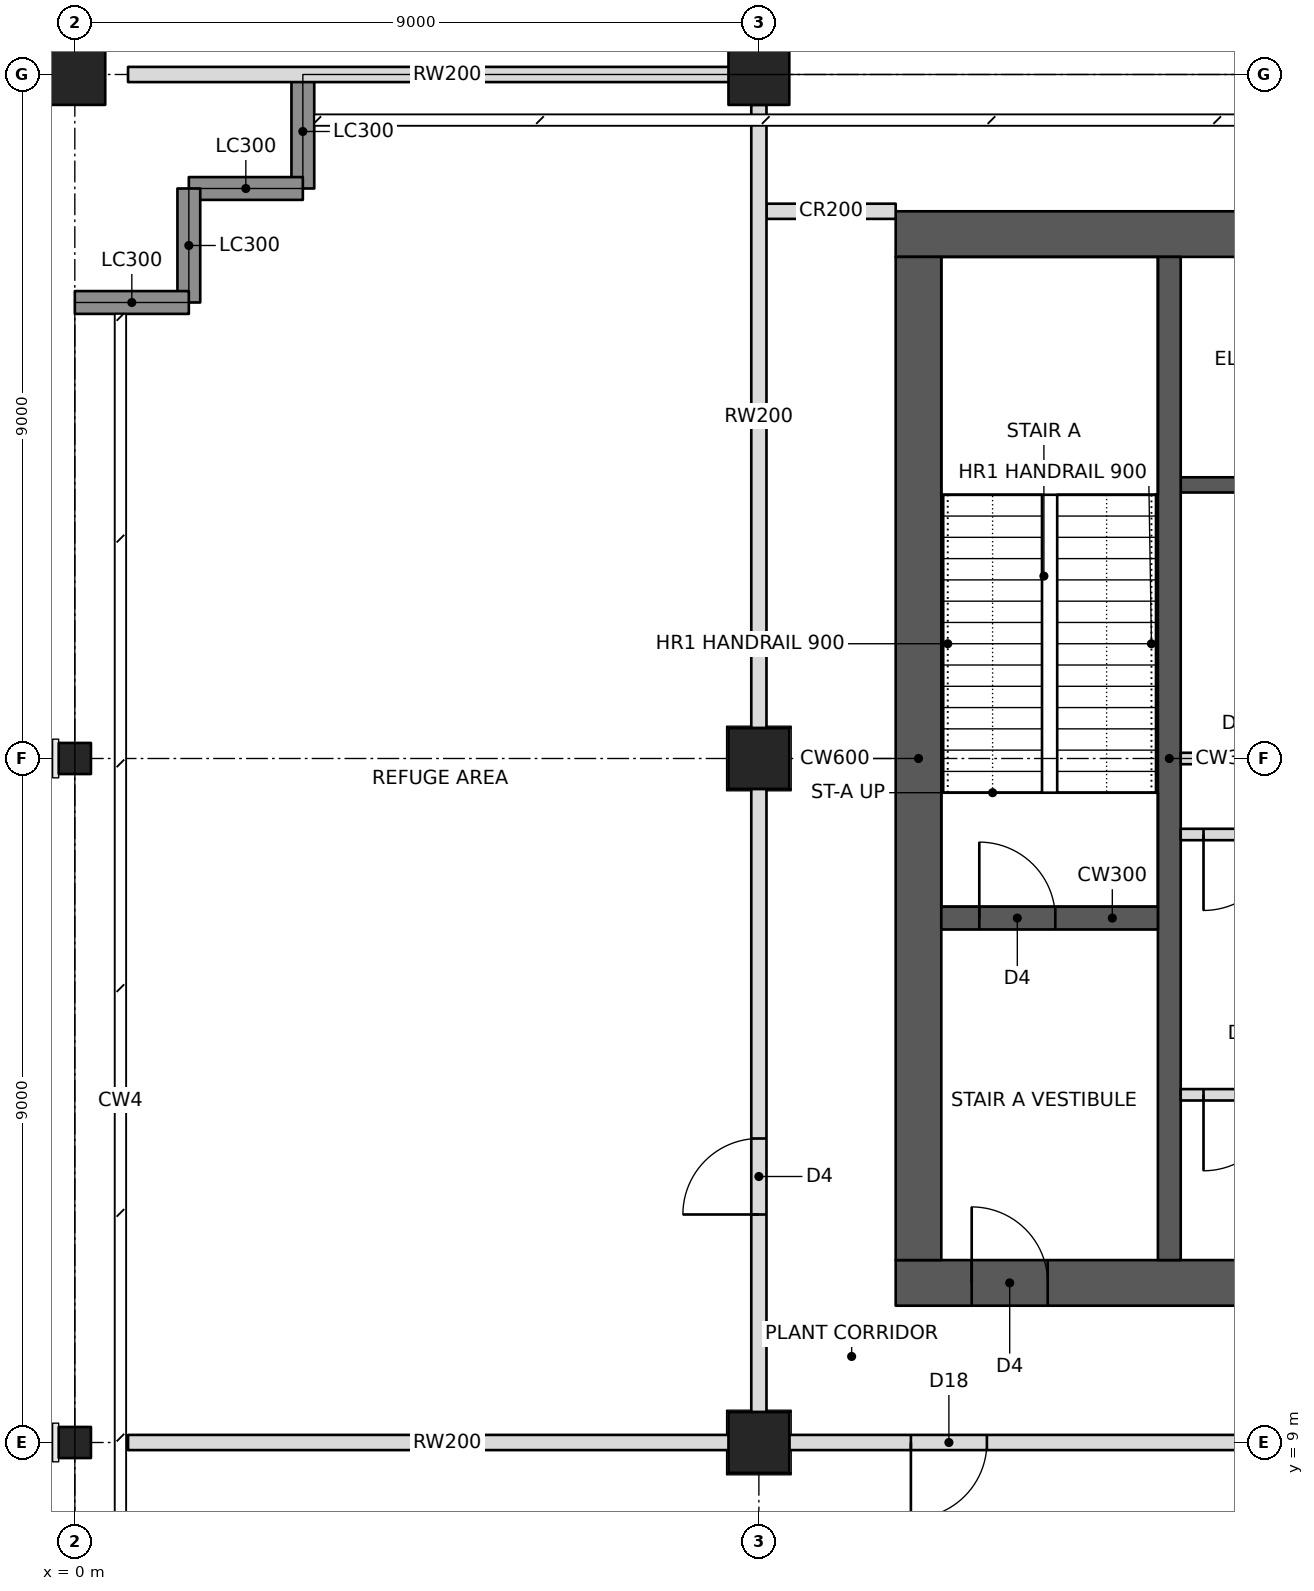
"""IFC4 building model, lengths in metres.
Left out: names, types, materials, properties, quantities, classifications, styles, units other than length and angle.
Written with IfcOpenShell. Run it as: python <this file> out.ifc"""

import sys

from ifc_helpers import new_model, si_unit, direction, frame, frame_2d, origin, origin_2d, place, context, subcontext, project, spatial, rectangle, hollow_rectangle, i_section, extrude, element, fill, save


model = new_model("IFC4")
c1 = context("Model", 3, precision=1e-05, world=origin(), true_north=direction((0.0, 1.0)))
c2 = subcontext(c1, "Body", "Model", "MODEL_VIEW")
j1 = project(units=[si_unit("LENGTHUNIT", "METRE"), si_unit("PLANEANGLEUNIT", "RADIAN")], contexts=[c1])
p1 = place(None, origin())
s1 = spatial("IfcSite", under=j1, at=p1, CompositionType="ELEMENT")
p2 = place(p1, origin())
s2 = spatial("IfcBuilding", under=s1, at=p2, CompositionType="ELEMENT")
p3 = place(p2, frame((0.0, 0.0, 274.8)))
s3 = spatial("IfcBuildingStorey", under=s2, at=p3, CompositionType="ELEMENT", Elevation=274.8)
for number, where, z_axis, x_axis in (
    (1, (0.0, 9.0, 0.0), (0.0, 0.0, 1.0), (0.0, 1.0, 0.0)),
    (2, (0.0, 18.0, 0.0), (0.0, 0.0, 1.0), (0.0, 1.0, 0.0)),
):
    element("IfcColumn", number, at=place(p3, frame(where, z_axis=z_axis, x_axis=x_axis)), inside=s3, PredefinedType="COLUMN", context=c2, shape_type="SweptSolid", body=[
        extrude(i_section(OverallWidth=0.409, OverallDepth=0.424, WebThickness=0.033, FlangeThickness=0.052, at=origin_2d()), origin(), (0.0, 0.0, 1.0), 5.0),
    ])
for number, where, z_axis, x_axis in (
    (3, (0.0, 27.0, 0.0), (0.0, 0.0, 1.0), (0.0, 1.0, 0.0)),
    (4, (9.0, 9.0, 0.0), (0.0, 0.0, 1.0), (1.0, 0.0, 0.0)),
    (5, (9.0, 18.0, 0.0), (0.0, 0.0, 1.0), (1.0, 0.0, 0.0)),
    (6, (9.0, 27.0, 0.0), (0.0, 0.0, 1.0), (1.0, 0.0, 0.0)),
):
    element("IfcColumn", number, at=place(p3, frame(where, z_axis=z_axis, x_axis=x_axis)), inside=s3, PredefinedType="COLUMN", context=c2, shape_type="SweptSolid", body=[
        extrude(hollow_rectangle(XDim=0.8, YDim=0.8, WallThickness=0.025, at=origin_2d()), origin(), (0.0, 0.0, 1.0), 5.0),
    ])
p4 = place(p3, frame((10.8, 11.1, 0.0), z_axis=(0.0, 0.0, 1.0), x_axis=(1.0, 0.0, 0.0)))
e7 = element("IfcWall", 7, at=p4, inside=s3, PredefinedType="SHEAR", context=c2, shape_type="SweptSolid", body=[
    extrude(rectangle(XDim=23.4, YDim=0.6, at=frame_2d((11.7, 0.0))), origin(), (0.0, 0.0, 1.0), 4.7),
])
p5 = place(p4, frame((1.0, 0.0, 0.0)))
e8 = element("IfcOpeningElement", 8, at=p5, cuts=e7, PredefinedType="OPENING", context=c2, shape_type="SweptSolid", body=[
    extrude(rectangle(XDim=1.0, YDim=2.1, at=frame_2d((0.5, 1.05))), frame((0.0, 0.31, 0.0), z_axis=(0.0, -1.0, 0.0), x_axis=(1.0, 0.0, 0.0)), (0.0, 0.0, 1.0), 0.62),
])
p6 = place(p4, frame((17.2, 0.0, 0.0)))
e9 = element("IfcOpeningElement", 9, at=p6, cuts=e7, PredefinedType="OPENING", context=c2, shape_type="SweptSolid", body=[
    extrude(rectangle(XDim=1.8, YDim=2.1, at=frame_2d((0.9, 1.05))), frame((0.0, 0.31, 0.0), z_axis=(0.0, -1.0, 0.0), x_axis=(1.0, 0.0, 0.0)), (0.0, 0.0, 1.0), 0.62),
])
p7 = place(p3, frame((10.8, 24.9, 0.0), z_axis=(0.0, 0.0, 1.0), x_axis=(1.0, 0.0, 0.0)))
e10 = element("IfcWall", 10, at=p7, inside=s3, PredefinedType="SHEAR", context=c2, shape_type="SweptSolid", body=[
    extrude(rectangle(XDim=23.4, YDim=0.6, at=frame_2d((11.7, 0.0))), origin(), (0.0, 0.0, 1.0), 4.7),
])
p8 = place(p7, frame((17.2, 0.0, 0.0)))
e11 = element("IfcOpeningElement", 11, at=p8, cuts=e10, PredefinedType="OPENING", context=c2, shape_type="SweptSolid", body=[
    extrude(rectangle(XDim=1.8, YDim=2.1, at=frame_2d((0.9, 1.05))), frame((0.0, 0.31, 0.0), z_axis=(0.0, -1.0, 0.0), x_axis=(1.0, 0.0, 0.0)), (0.0, 0.0, 1.0), 0.62),
])
p9 = place(p7, frame((21.1, 0.0, 0.0)))
e12 = element("IfcOpeningElement", 12, at=p9, cuts=e10, PredefinedType="OPENING", context=c2, shape_type="SweptSolid", body=[
    extrude(rectangle(XDim=1.0, YDim=2.1, at=frame_2d((0.5, 1.05))), frame((0.0, 0.31, 0.0), z_axis=(0.0, -1.0, 0.0), x_axis=(1.0, 0.0, 0.0)), (0.0, 0.0, 1.0), 0.62),
])
p10 = place(p7, frame((4.9, 0.0, 0.0)))
e13 = element("IfcOpeningElement", 13, at=p10, cuts=e10, PredefinedType="OPENING", context=c2, shape_type="SweptSolid", body=[
    extrude(rectangle(XDim=1.0, YDim=2.1, at=frame_2d((0.5, 1.05))), frame((0.0, 0.31, 0.0), z_axis=(0.0, -1.0, 0.0), x_axis=(1.0, 0.0, 0.0)), (0.0, 0.0, 1.0), 0.62),
])
p11 = place(p3, frame((11.1, 11.4, 0.0), z_axis=(0.0, 0.0, 1.0), x_axis=(0.0, 1.0, 0.0)))
e14 = element("IfcWall", 14, at=p11, inside=s3, PredefinedType="SHEAR", context=c2, shape_type="SweptSolid", body=[
    extrude(rectangle(XDim=13.2, YDim=0.6, at=frame_2d((6.6, 0.0))), origin(), (0.0, 0.0, 1.0), 4.7),
])
p12 = place(p3, frame((14.4, 11.4, 0.0), z_axis=(0.0, 0.0, 1.0), x_axis=(0.0, 1.0, 0.0)))
e15 = element("IfcWall", 15, at=p12, inside=s3, PredefinedType="SHEAR", context=c2, shape_type="SweptSolid", body=[
    extrude(rectangle(XDim=13.2, YDim=0.3, at=frame_2d((6.6, 0.0))), origin(), (0.0, 0.0, 1.0), 4.7),
])
p13 = place(p3, frame((11.4, 15.9, 0.0), z_axis=(0.0, 0.0, 1.0), x_axis=(1.0, 0.0, 0.0)))
e16 = element("IfcWall", 16, at=p13, inside=s3, PredefinedType="SHEAR", context=c2, shape_type="SweptSolid", body=[
    extrude(rectangle(XDim=2.85, YDim=0.3, at=frame_2d((1.425, 0.0))), origin(), (0.0, 0.0, 1.0), 4.7),
])
p14 = place(p13, frame((0.5, 0.0, 0.0)))
e17 = element("IfcOpeningElement", 17, at=p14, cuts=e16, PredefinedType="OPENING", context=c2, shape_type="SweptSolid", body=[
    extrude(rectangle(XDim=1.0, YDim=2.1, at=frame_2d((0.5, 1.05))), frame((0.0, 0.16, 0.0), z_axis=(0.0, -1.0, 0.0), x_axis=(1.0, 0.0, 0.0)), (0.0, 0.0, 1.0), 0.32),
])
p15 = place(p3, frame((14.55, 18.0, 0.0), z_axis=(0.0, 0.0, 1.0), x_axis=(1.0, 0.0, 0.0)))
e18 = element("IfcWall", 18, at=p15, inside=s3, PredefinedType="PARTITIONING", context=c2, shape_type="SweptSolid", body=[
    extrude(rectangle(XDim=3.3, YDim=0.15, at=frame_2d((1.65, 0.0))), origin(), (0.0, 0.0, 1.0), 4.7),
])
p16 = place(p3, frame((14.55, 21.6, 0.0), z_axis=(0.0, 0.0, 1.0), x_axis=(1.0, 0.0, 0.0)))
e19 = element("IfcWall", 19, at=p16, inside=s3, PredefinedType="SHEAR", context=c2, shape_type="SweptSolid", body=[
    extrude(rectangle(XDim=3.3, YDim=0.2, at=frame_2d((1.65, 0.0))), origin(), (0.0, 0.0, 1.0), 4.7),
])
p17 = place(p3, frame((3.0, 27.0, 0.0), z_axis=(0.0, 0.0, 1.0), x_axis=(0.0, -1.0, 0.0)))
e20 = element("IfcWall", 20, at=p17, inside=s3, PredefinedType="SOLIDWALL", context=c2, shape_type="SweptSolid", body=[
    extrude(rectangle(XDim=1.5, YDim=0.3, at=frame_2d((0.75, 0.0))), origin(), (0.0, 0.0, 1.0), 3.92),
])
p18 = place(p3, frame((3.0, 25.5, 0.0), z_axis=(0.0, 0.0, 1.0), x_axis=(-1.0, 0.0, 0.0)))
e21 = element("IfcWall", 21, at=p18, inside=s3, PredefinedType="SOLIDWALL", context=c2, shape_type="SweptSolid", body=[
    extrude(rectangle(XDim=1.5, YDim=0.3, at=frame_2d((0.75, 0.0))), origin(), (0.0, 0.0, 1.0), 4.092),
])
p19 = place(p3, frame((1.5, 25.5, 0.0), z_axis=(0.0, 0.0, 1.0), x_axis=(0.0, -1.0, 0.0)))
e22 = element("IfcWall", 22, at=p19, inside=s3, PredefinedType="SOLIDWALL", context=c2, shape_type="SweptSolid", body=[
    extrude(rectangle(XDim=1.5, YDim=0.3, at=frame_2d((0.75, 0.0))), origin(), (0.0, 0.0, 1.0), 4.7),
])
p20 = place(p3, frame((1.5, 24.0, 0.0), z_axis=(0.0, 0.0, 1.0), x_axis=(-1.0, 0.0, 0.0)))
e23 = element("IfcWall", 23, at=p20, inside=s3, PredefinedType="SOLIDWALL", context=c2, shape_type="SweptSolid", body=[
    extrude(rectangle(XDim=1.5, YDim=0.3, at=frame_2d((0.75, 0.0))), origin(), (0.0, 0.0, 1.0), 3.92),
])
p21 = place(p3, frame((9.0, 9.4, 0.0), z_axis=(0.0, 0.0, 1.0), x_axis=(0.0, 1.0, 0.0)))
e24 = element("IfcWall", 24, at=p21, inside=s3, PredefinedType="PARTITIONING", context=c2, shape_type="SweptSolid", body=[
    extrude(rectangle(XDim=8.2, YDim=0.2, at=frame_2d((4.1, 0.0))), origin(), (0.0, 0.0, 1.0), 3.938),
])
p22 = place(p21, frame((2.6, 0.0, 0.0)))
e25 = element("IfcOpeningElement", 25, at=p22, cuts=e24, PredefinedType="OPENING", context=c2, shape_type="SweptSolid", body=[
    extrude(rectangle(XDim=1.0, YDim=2.1, at=frame_2d((0.5, 1.05))), frame((0.0, 0.11, 0.0), z_axis=(0.0, -1.0, 0.0), x_axis=(1.0, 0.0, 0.0)), (0.0, 0.0, 1.0), 0.22),
])
p23 = place(p3, frame((9.0, 18.4, 0.0), z_axis=(0.0, 0.0, 1.0), x_axis=(0.0, 1.0, 0.0)))
e26 = element("IfcWall", 26, at=p23, inside=s3, PredefinedType="PARTITIONING", context=c2, shape_type="SweptSolid", body=[
    extrude(rectangle(XDim=8.2, YDim=0.2, at=frame_2d((4.1, 0.0))), origin(), (0.0, 0.0, 1.0), 3.938),
])
p24 = place(p3, frame((0.7, 9.0, 0.0), z_axis=(0.0, 0.0, 1.0), x_axis=(1.0, 0.0, 0.0)))
e27 = element("IfcWall", 27, at=p24, inside=s3, PredefinedType="PARTITIONING", context=c2, shape_type="SweptSolid", body=[
    extrude(rectangle(XDim=8.4, YDim=0.2, at=frame_2d((4.2, 0.0))), origin(), (0.0, 0.0, 1.0), 3.938),
])
p25 = place(p3, frame((0.7, 27.0, 0.0), z_axis=(0.0, 0.0, 1.0), x_axis=(1.0, 0.0, 0.0)))
e28 = element("IfcWall", 28, at=p25, inside=s3, PredefinedType="PARTITIONING", context=c2, shape_type="SweptSolid", body=[
    extrude(rectangle(XDim=8.4, YDim=0.2, at=frame_2d((4.2, 0.0))), origin(), (0.0, 0.0, 1.0), 3.92),
])
p26 = place(p3, frame((9.4, 9.0, 0.0), z_axis=(0.0, 0.0, 1.0), x_axis=(1.0, 0.0, 0.0)))
e29 = element("IfcWall", 29, at=p26, inside=s3, PredefinedType="PARTITIONING", context=c2, shape_type="SweptSolid", body=[
    extrude(rectangle(XDim=8.2, YDim=0.2, at=frame_2d((4.1, 0.0))), origin(), (0.0, 0.0, 1.0), 3.938),
])
p27 = place(p26, frame((1.6, 0.0, 0.0)))
e30 = element("IfcOpeningElement", 30, at=p27, cuts=e29, PredefinedType="OPENING", context=c2, shape_type="SweptSolid", body=[
    extrude(rectangle(XDim=1.0, YDim=2.1, at=frame_2d((0.5, 1.05))), frame((0.0, 0.11, 0.0), z_axis=(0.0, -1.0, 0.0), x_axis=(1.0, 0.0, 0.0)), (0.0, 0.0, 1.0), 0.22),
])
p28 = place(p3, frame((9.1, 25.2, 0.0), z_axis=(0.0, 0.0, 1.0), x_axis=(1.0, 0.0, 0.0)))
e31 = element("IfcWall", 31, at=p28, inside=s3, PredefinedType="PARTITIONING", context=c2, shape_type="SweptSolid", body=[
    extrude(rectangle(XDim=1.7, YDim=0.2, at=frame_2d((0.85, 0.0))), origin(), (0.0, 0.0, 1.0), 3.938),
])
p29 = place(p3, frame((14.55, 17.0, 0.0), z_axis=(0.0, 0.0, 1.0), x_axis=(1.0, 0.0, 0.0)))
e32 = element("IfcWall", 32, at=p29, inside=s3, PredefinedType="PARTITIONING", context=c2, shape_type="SweptSolid", body=[
    extrude(rectangle(XDim=3.3, YDim=0.15, at=frame_2d((1.65, 0.0))), origin(), (0.0, 0.0, 1.0), 4.7),
])
p30 = place(p29, frame((0.3, 0.0, 0.0)))
e33 = element("IfcOpeningElement", 33, at=p30, cuts=e32, PredefinedType="OPENING", context=c2, shape_type="SweptSolid", body=[
    extrude(rectangle(XDim=1.0, YDim=2.1, at=frame_2d((0.5, 1.05))), frame((0.0, 0.085, 0.0), z_axis=(0.0, -1.0, 0.0), x_axis=(1.0, 0.0, 0.0)), (0.0, 0.0, 1.0), 0.17),
])
p31 = place(p3, frame((14.55, 13.575, 0.0), z_axis=(0.0, 0.0, 1.0), x_axis=(1.0, 0.0, 0.0)))
e34 = element("IfcWall", 34, at=p31, inside=s3, PredefinedType="PARTITIONING", context=c2, shape_type="SweptSolid", body=[
    extrude(rectangle(XDim=3.3, YDim=0.15, at=frame_2d((1.65, 0.0))), origin(), (0.0, 0.0, 1.0), 4.7),
])
p32 = place(p31, frame((0.3, 0.0, 0.0)))
e35 = element("IfcOpeningElement", 35, at=p32, cuts=e34, PredefinedType="OPENING", context=c2, shape_type="SweptSolid", body=[
    extrude(rectangle(XDim=1.0, YDim=2.1, at=frame_2d((0.5, 1.05))), frame((0.0, 0.085, 0.0), z_axis=(0.0, -1.0, 0.0), x_axis=(1.0, 0.0, 0.0)), (0.0, 0.0, 1.0), 0.17),
])
p33 = place(p22, origin())
e36 = element("IfcDoor", 36, at=p33, inside=s3, OperationType="SINGLE_SWING_LEFT", PredefinedType="DOOR", context=c2, shape_type="SweptSolid", body=[
    extrude(rectangle(XDim=1.0, YDim=2.1, at=frame_2d((0.5, 1.05))), frame((0.0, 0.025, 0.0), z_axis=(0.0, -1.0, 0.0), x_axis=(1.0, 0.0, 0.0)), (0.0, 0.0, 1.0), 0.05),
])
fill(e25, e36)
p34 = place(p27, frame((1.0, 0.0, 0.0), z_axis=(0.0, 0.0, 1.0), x_axis=(-1.0, 0.0, 0.0)))
e37 = element("IfcDoor", 37, at=p34, inside=s3, OperationType="SINGLE_SWING_RIGHT", PredefinedType="DOOR", context=c2, shape_type="SweptSolid", body=[
    extrude(rectangle(XDim=1.0, YDim=2.1, at=frame_2d((0.5, 1.05))), frame((0.0, 0.025, 0.0), z_axis=(0.0, -1.0, 0.0), x_axis=(1.0, 0.0, 0.0)), (0.0, 0.0, 1.0), 0.05),
])
fill(e30, e37)
p35 = place(p30, frame((1.0, 0.0, 0.0), z_axis=(0.0, 0.0, 1.0), x_axis=(-1.0, 0.0, 0.0)))
e38 = element("IfcDoor", 38, at=p35, inside=s3, OperationType="SINGLE_SWING_RIGHT", PredefinedType="DOOR", context=c2, shape_type="SweptSolid", body=[
    extrude(rectangle(XDim=1.0, YDim=2.1, at=frame_2d((0.5, 1.05))), frame((0.0, 0.025, 0.0), z_axis=(0.0, -1.0, 0.0), x_axis=(1.0, 0.0, 0.0)), (0.0, 0.0, 1.0), 0.05),
])
fill(e33, e38)
p36 = place(p32, frame((1.0, 0.0, 0.0), z_axis=(0.0, 0.0, 1.0), x_axis=(-1.0, 0.0, 0.0)))
e39 = element("IfcDoor", 39, at=p36, inside=s3, OperationType="SINGLE_SWING_RIGHT", PredefinedType="DOOR", context=c2, shape_type="SweptSolid", body=[
    extrude(rectangle(XDim=1.0, YDim=2.1, at=frame_2d((0.5, 1.05))), frame((0.0, 0.025, 0.0), z_axis=(0.0, -1.0, 0.0), x_axis=(1.0, 0.0, 0.0)), (0.0, 0.0, 1.0), 0.05),
])
fill(e35, e39)
p37 = place(p5, origin())
e40 = element("IfcDoor", 40, at=p37, inside=s3, OperationType="SINGLE_SWING_LEFT", PredefinedType="DOOR", context=c2, shape_type="SweptSolid", body=[
    extrude(rectangle(XDim=1.0, YDim=2.1, at=frame_2d((0.5, 1.05))), frame((0.0, 0.025, 0.0), z_axis=(0.0, -1.0, 0.0), x_axis=(1.0, 0.0, 0.0)), (0.0, 0.0, 1.0), 0.05),
])
fill(e8, e40)
p38 = place(p14, origin())
e41 = element("IfcDoor", 41, at=p38, inside=s3, OperationType="SINGLE_SWING_LEFT", PredefinedType="DOOR", context=c2, shape_type="SweptSolid", body=[
    extrude(rectangle(XDim=1.0, YDim=2.1, at=frame_2d((0.5, 1.05))), frame((0.0, 0.025, 0.0), z_axis=(0.0, -1.0, 0.0), x_axis=(1.0, 0.0, 0.0)), (0.0, 0.0, 1.0), 0.05),
])
fill(e17, e41)
save(model, sys.argv[1])
